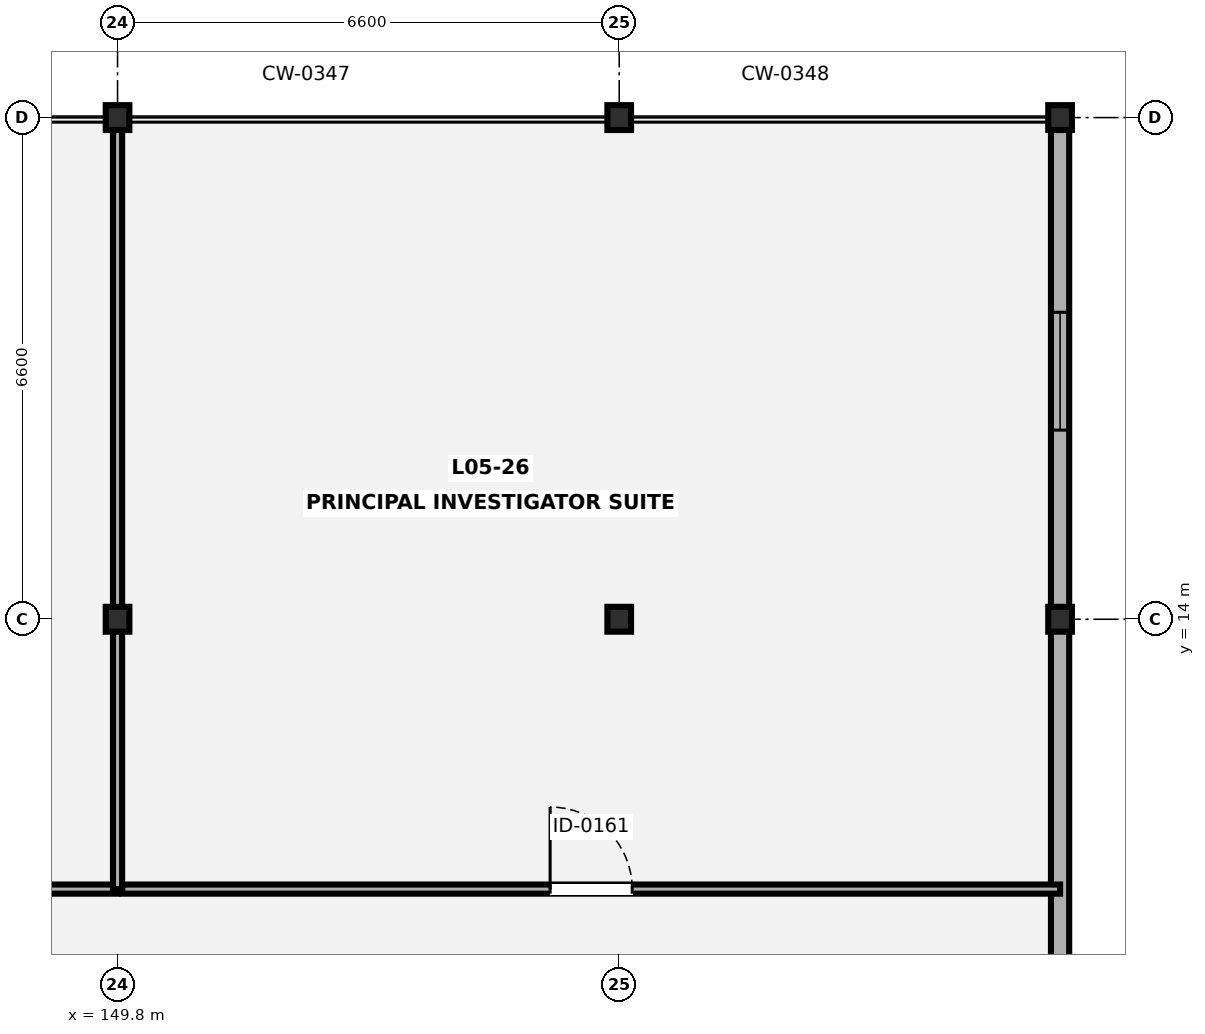
"""IFC4 building model, lengths in metres.
Left out: names, types, materials, properties, quantities, classifications, styles, units other than length and angle.
Written with IfcOpenShell. Run it as: python <this file> out.ifc"""

import sys

from ifc_helpers import new_model, si_unit, direction, frame, frame_2d, origin, origin_2d, place, context, subcontext, project, spatial, rectangle, i_section, extrude, element, fill, save


model = new_model("IFC4")
c1 = context("Model", 3, precision=1e-05, world=origin(), true_north=direction((0.0, 1.0)))
c2 = subcontext(c1, "Body", "Model", "MODEL_VIEW")
j1 = project(units=[si_unit("LENGTHUNIT", "METRE"), si_unit("PLANEANGLEUNIT", "RADIAN")], contexts=[c1])
p1 = place(None, origin())
s1 = spatial("IfcSite", under=j1, at=p1, CompositionType="ELEMENT")
p2 = place(p1, origin())
s2 = spatial("IfcBuilding", under=s1, at=p2, CompositionType="ELEMENT")
p3 = place(p2, frame((0.0, 0.0, 21.7)))
s3 = spatial("IfcBuildingStorey", under=s2, at=p3, CompositionType="ELEMENT", Elevation=21.7)
for number, where, z_axis, x_axis in (
    (1, (149.8, 14.0, 0.0), (0.0, 0.0, 1.0), (1.0, 0.0, 0.0)),
    (2, (149.8, 20.6, 0.0), (0.0, 0.0, 1.0), (1.0, 0.0, 0.0)),
    (3, (156.4, 14.0, 0.0), (0.0, 0.0, 1.0), (1.0, 0.0, 0.0)),
    (4, (156.4, 20.6, 0.0), (0.0, 0.0, 1.0), (1.0, 0.0, 0.0)),
):
    element("IfcColumn", number, at=place(p3, frame(where, z_axis=z_axis, x_axis=x_axis)), inside=s3, PredefinedType="COLUMN", context=c2, shape_type="SweptSolid", body=[
        extrude(i_section(OverallWidth=0.311, OverallDepth=0.327, WebThickness=0.016, FlangeThickness=0.025, FilletRadius=0.017, at=origin_2d()), origin(), (0.0, 0.0, 1.0), 4.2),
    ])
for number, where, z_axis, x_axis in (
    (5, (162.2, 14.0, 0.0), (0.0, 0.0, 1.0), (1.0, 0.0, 0.0)),
    (6, (162.2, 20.6, 0.0), (0.0, 0.0, 1.0), (1.0, 0.0, 0.0)),
):
    element("IfcColumn", number, at=place(p3, frame(where, z_axis=z_axis, x_axis=x_axis)), inside=s3, PredefinedType="COLUMN", context=c2, shape_type="SweptSolid", body=[
        extrude(i_section(OverallWidth=0.311, OverallDepth=0.327, WebThickness=0.016, FlangeThickness=0.025, FilletRadius=0.017, at=origin_2d()), origin(), (0.0, 0.0, 1.0), 3.92),
    ])
p4 = place(p3, frame((162.2, 20.438, 0.0), z_axis=(0.0, 0.0, 1.0), x_axis=(0.0, -1.0, 0.0)))
e7 = element("IfcWall", 7, at=p4, inside=s3, PredefinedType="SOLIDWALL", context=c2, shape_type="SweptSolid", body=[
    extrude(rectangle(XDim=19.477, YDim=0.24, at=frame_2d((9.739, 0.0))), origin(), (0.0, 0.0, 1.0), 3.372),
])
p5 = place(p4, frame((2.4, 0.0, 0.85)))
e8 = element("IfcOpeningElement", 8, at=p5, cuts=e7, PredefinedType="OPENING", context=c2, shape_type="SweptSolid", body=[
    extrude(rectangle(XDim=1.55, YDim=1.4, at=frame_2d((0.775, 0.7))), frame((0.0, 0.13, 0.0), z_axis=(0.0, -1.0, 0.0), x_axis=(1.0, 0.0, 0.0)), (0.0, 0.0, 1.0), 0.26),
])
p6 = place(p4, frame((15.1, 0.0, 0.85)))
e9 = element("IfcOpeningElement", 9, at=p6, cuts=e7, PredefinedType="OPENING", context=c2, shape_type="SweptSolid", body=[
    extrude(rectangle(XDim=1.95, YDim=1.5, at=frame_2d((0.975, 0.75))), frame((0.0, 0.13, 0.0), z_axis=(0.0, -1.0, 0.0), x_axis=(1.0, 0.0, 0.0)), (0.0, 0.0, 1.0), 0.26),
])
p7 = place(p3, frame((136.662, 10.45, 0.0), z_axis=(0.0, 0.0, 1.0), x_axis=(1.0, 0.0, 0.0)))
e10 = element("IfcWall", 10, at=p7, inside=s3, PredefinedType="PARTITIONING", context=c2, shape_type="SweptSolid", body=[
    extrude(rectangle(XDim=13.138, YDim=0.12, at=frame_2d((6.569, 0.0))), origin(), (0.0, 0.0, 1.0), 3.546),
])
p8 = place(p7, frame((5.844, 0.0, 0.0)))
e11 = element("IfcOpeningElement", 11, at=p8, cuts=e10, PredefinedType="OPENING", context=c2, shape_type="SweptSolid", body=[
    extrude(rectangle(XDim=1.45, YDim=2.12, at=frame_2d((0.725, 1.06))), frame((0.0, 0.07, 0.0), z_axis=(0.0, -1.0, 0.0), x_axis=(1.0, 0.0, 0.0)), (0.0, 0.0, 1.0), 0.14),
])
p9 = place(p3, frame((149.8, 10.45, 0.0), z_axis=(0.0, 0.0, 1.0), x_axis=(0.0, 1.0, 0.0)))
e12 = element("IfcWall", 12, at=p9, inside=s3, PredefinedType="PARTITIONING", context=c2, shape_type="SweptSolid", body=[
    extrude(rectangle(XDim=10.15, YDim=0.12, at=frame_2d((5.075, 0.0))), origin(), (0.0, 0.0, 1.0), 3.372),
])
p10 = place(p3, frame((149.862, 10.45, 0.0), z_axis=(0.0, 0.0, 1.0), x_axis=(1.0, 0.0, 0.0)))
e13 = element("IfcWall", 13, at=p10, inside=s3, PredefinedType="PARTITIONING", context=c2, shape_type="SweptSolid", body=[
    extrude(rectangle(XDim=12.338, YDim=0.12, at=frame_2d((6.169, 0.0))), origin(), (0.0, 0.0, 1.0), 3.546),
])
p11 = place(p10, frame((5.629, 0.0, 0.0)))
e14 = element("IfcOpeningElement", 14, at=p11, cuts=e13, PredefinedType="OPENING", context=c2, shape_type="SweptSolid", body=[
    extrude(rectangle(XDim=1.08, YDim=2.12, at=frame_2d((0.54, 1.06))), frame((0.0, 0.07, 0.0), z_axis=(0.0, -1.0, 0.0), x_axis=(1.0, 0.0, 0.0)), (0.0, 0.0, 1.0), 0.14),
])
p12 = place(p5, origin())
e15 = element("IfcWindow", 15, at=p12, inside=s3, PartitioningType="SINGLE_PANEL", PredefinedType="WINDOW", context=c2, shape_type="SweptSolid", body=[
    extrude(rectangle(XDim=1.55, YDim=1.4, at=frame_2d((0.775, 0.7))), frame((0.0, 0.03, 0.0), z_axis=(0.0, -1.0, 0.0), x_axis=(1.0, 0.0, 0.0)), (0.0, 0.0, 1.0), 0.06),
])
fill(e8, e15)
p13 = place(p11, origin())
e16 = element("IfcDoor", 16, at=p13, inside=s3, OperationType="SINGLE_SWING_LEFT", PredefinedType="DOOR", context=c2, shape_type="SweptSolid", body=[
    extrude(rectangle(XDim=1.08, YDim=2.12, at=frame_2d((0.54, 1.06))), frame((0.0, 0.025, 0.0), z_axis=(0.0, -1.0, 0.0), x_axis=(1.0, 0.0, 0.0)), (0.0, 0.0, 1.0), 0.05),
])
fill(e14, e16)
save(model, sys.argv[1])
